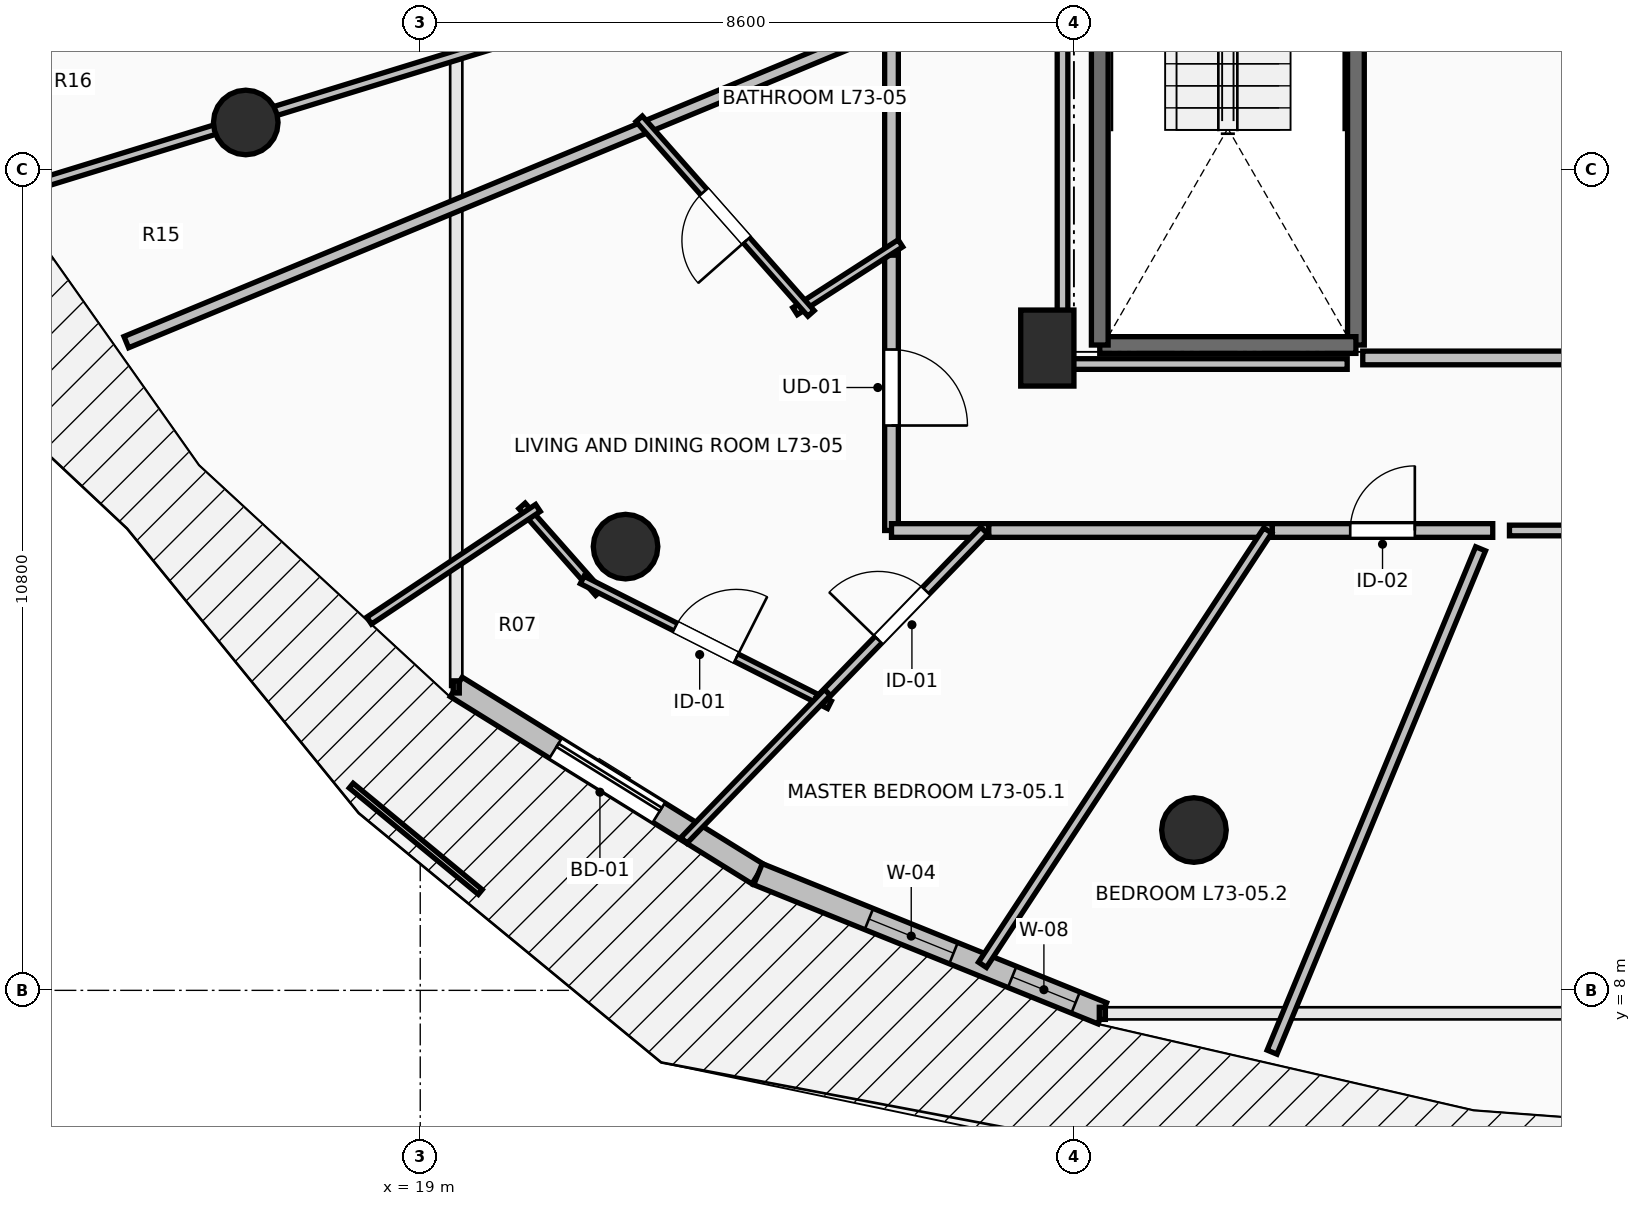
"""IFC4 building model, lengths in metres.
Left out: names, types, materials, properties, quantities, classifications, styles, units other than length and angle.
Written with IfcOpenShell. Run it as: python <this file> out.ifc"""

import sys

from ifc_helpers import new_model, si_unit, direction, frame, frame_2d, origin, origin_2d, place, context, subcontext, project, spatial, rectangle, circle, extrude, element, fill, save


model = new_model("IFC4")
c1 = context("Model", 3, precision=1e-05, world=origin(), true_north=direction((0.0, 1.0)))
c2 = subcontext(c1, "Body", "Model", "MODEL_VIEW")
j1 = project(units=[si_unit("LENGTHUNIT", "METRE"), si_unit("PLANEANGLEUNIT", "RADIAN")], contexts=[c1])
p1 = place(None, origin())
s1 = spatial("IfcSite", under=j1, at=p1, CompositionType="ELEMENT")
p2 = place(p1, origin())
s2 = spatial("IfcBuilding", under=s1, at=p2, CompositionType="ELEMENT")
p3 = place(p2, frame((0.0, 0.0, 269.75)))
s3 = spatial("IfcBuildingStorey", under=s2, at=p3, CompositionType="ELEMENT", Elevation=269.75)
for number, where, z_axis, x_axis in (
    (1, (16.705, 19.418, 0.0), (0.0, 0.0, 1.0), (-0.924, -0.383, 0.0)),
    (2, (21.701, 13.838, 0.0), (0.0, 0.0, 1.0), (-0.707, -0.707, 0.0)),
    (3, (29.179, 10.109, 0.0), (0.0, 0.0, 1.0), (-0.383, -0.924, 0.0)),
):
    element("IfcColumn", number, at=place(p3, frame(where, z_axis=z_axis, x_axis=x_axis)), inside=s3, PredefinedType="COLUMN", context=c2, shape_type="SweptSolid", body=[
        extrude(circle(Radius=0.425, at=origin_2d()), origin(), (0.0, 0.0, 1.0), 3.55),
    ])
p4 = place(p3, frame((27.25, 16.45, 0.0), z_axis=(0.0, 0.0, 1.0), x_axis=(1.0, 0.0, 0.0)))
e4 = element("IfcColumn", 4, at=p4, inside=s3, PredefinedType="PILASTER", context=c2, shape_type="SweptSolid", body=[
    extrude(rectangle(XDim=0.7, YDim=1.0, at=origin_2d()), origin(), (0.0, 0.0, 1.0), 3.55),
])
p5 = place(p3, frame((19.474, 11.992, 0.0), z_axis=(0.0, 0.0, 1.0), x_axis=(0.849702323036, -0.527262707032, 0.0)))
e5 = element("IfcWall", 5, at=p5, inside=s3, PredefinedType="STANDARD", context=c2, shape_type="SweptSolid", body=[
    extrude(rectangle(XDim=4.672, YDim=0.3, at=frame_2d((2.336, 0.0))), origin(), (0.0, 0.0, 1.0), 3.29),
])
p6 = place(p5, frame((1.536, 0.0, 0.0)))
e6 = element("IfcOpeningElement", 6, at=p6, cuts=e5, PredefinedType="OPENING", context=c2, shape_type="SweptSolid", body=[
    extrude(rectangle(XDim=1.6, YDim=2.3, at=frame_2d((0.8, 1.15))), frame((0.0, 0.165, 0.0), z_axis=(0.0, -1.0, 0.0), x_axis=(1.0, 0.0, 0.0)), (0.0, 0.0, 1.0), 0.33),
])
p7 = place(p3, frame((23.444, 9.529, 0.0), z_axis=(0.0, 0.0, 1.0), x_axis=(0.927147375511, -0.374696869594, 0.0)))
e7 = element("IfcWall", 7, at=p7, inside=s3, PredefinedType="STANDARD", context=c2, shape_type="SweptSolid", body=[
    extrude(rectangle(XDim=4.885, YDim=0.3, at=frame_2d((2.443, 0.0))), origin(), (0.0, 0.0, 1.0), 3.29),
])
p8 = place(p7, frame((1.574, 0.0, 0.85)))
e8 = element("IfcOpeningElement", 8, at=p8, cuts=e7, PredefinedType="OPENING", context=c2, shape_type="SweptSolid", body=[
    extrude(rectangle(XDim=1.2, YDim=1.95, at=frame_2d((0.6, 0.975))), frame((0.0, 0.165, 0.0), z_axis=(0.0, -1.0, 0.0), x_axis=(1.0, 0.0, 0.0)), (0.0, 0.0, 1.0), 0.33),
])
p9 = place(p7, frame((3.606, 0.0, 0.85)))
e9 = element("IfcOpeningElement", 9, at=p9, cuts=e7, PredefinedType="OPENING", context=c2, shape_type="SweptSolid", body=[
    extrude(rectangle(XDim=0.9, YDim=1.8, at=frame_2d((0.45, 0.9))), frame((0.0, 0.165, 0.0), z_axis=(0.0, -1.0, 0.0), x_axis=(1.0, 0.0, 0.0)), (0.0, 0.0, 1.0), 0.33),
])
p10 = place(p3, frame((31.31, 23.91, 0.0), z_axis=(0.0, 0.0, 1.0), x_axis=(0.0, -1.0, 0.0)))
e10 = element("IfcWall", 10, at=p10, inside=s3, PredefinedType="SOLIDWALL", context=c2, shape_type="SweptSolid", body=[
    extrude(rectangle(XDim=7.42, YDim=0.22, at=frame_2d((3.71, 0.0))), origin(), (0.0, 0.0, 1.0), 3.29),
])
p11 = place(p3, frame((31.31, 16.49, 0.0), z_axis=(0.0, 0.0, 1.0), x_axis=(-1.0, 0.0, 0.0)))
e11 = element("IfcWall", 11, at=p11, inside=s3, PredefinedType="SOLIDWALL", context=c2, shape_type="SweptSolid", body=[
    extrude(rectangle(XDim=3.37, YDim=0.22, at=frame_2d((1.685, 0.0))), origin(), (0.0, 0.0, 1.0), 3.29),
])
p12 = place(p3, frame((27.94, 16.49, 0.0), z_axis=(0.0, 0.0, 1.0), x_axis=(0.0, 1.0, 0.0)))
e12 = element("IfcWall", 12, at=p12, inside=s3, PredefinedType="SOLIDWALL", context=c2, shape_type="SweptSolid", body=[
    extrude(rectangle(XDim=7.42, YDim=0.22, at=frame_2d((3.71, 0.0))), origin(), (0.0, 0.0, 1.0), 3.29),
])
p13 = place(p3, frame((31.4, 16.32, 0.0), z_axis=(0.0, 0.0, 1.0), x_axis=(1.0, 0.0, 0.0)))
e13 = element("IfcWall", 13, at=p13, inside=s3, PredefinedType="PARTITIONING", context=c2, shape_type="SweptSolid", body=[
    extrude(rectangle(XDim=7.4, YDim=0.18, at=frame_2d((3.7, 0.0))), origin(), (0.0, 0.0, 1.0), 3.29),
])
p14 = place(p13, frame((3.275, 0.0, 0.0)))
e14 = element("IfcOpeningElement", 14, at=p14, cuts=e13, PredefinedType="OPENING", context=c2, shape_type="SweptSolid", body=[
    extrude(rectangle(XDim=0.85, YDim=2.1, at=frame_2d((0.425, 1.05))), frame((0.0, 0.105, 0.0), z_axis=(0.0, -1.0, 0.0), x_axis=(1.0, 0.0, 0.0)), (0.0, 0.0, 1.0), 0.21),
])
p15 = place(p3, frame((25.2, 17.812, 0.0), z_axis=(0.0, 0.0, 1.0), x_axis=(0.0, -1.0, 0.0)))
e15 = element("IfcWall", 15, at=p15, inside=s3, PredefinedType="PARTITIONING", context=c2, shape_type="SweptSolid", body=[
    extrude(rectangle(XDim=3.762, YDim=0.18, at=frame_2d((1.881, 0.0))), origin(), (0.0, 0.0, 1.0), 2.482),
])
p16 = place(p15, frame((1.381, 0.0, 0.0)))
e16 = element("IfcOpeningElement", 16, at=p16, cuts=e15, PredefinedType="OPENING", context=c2, shape_type="SweptSolid", body=[
    extrude(rectangle(XDim=1.0, YDim=2.15, at=frame_2d((0.5, 1.075))), frame((0.0, 0.105, 0.0), z_axis=(0.0, -1.0, 0.0), x_axis=(1.0, 0.0, 0.0)), (0.0, 0.0, 1.0), 0.21),
])
p17 = place(p3, frame((25.2, 14.05, 0.0), z_axis=(0.0, 0.0, 1.0), x_axis=(1.0, 0.0, 0.0)))
e17 = element("IfcWall", 17, at=p17, inside=s3, PredefinedType="PARTITIONING", context=c2, shape_type="SweptSolid", body=[
    extrude(rectangle(XDim=1.28, YDim=0.18, at=frame_2d((0.64, 0.0))), origin(), (0.0, 0.0, 1.0), 2.936),
])
p18 = place(p3, frame((25.2, 20.773, 0.0), z_axis=(0.0, 0.0, 1.0), x_axis=(0.0, -1.0, 0.0)))
e18 = element("IfcWall", 18, at=p18, inside=s3, PredefinedType="PARTITIONING", context=c2, shape_type="SweptSolid", body=[
    extrude(rectangle(XDim=3.101, YDim=0.18, at=frame_2d((1.55, 0.0))), origin(), (0.0, 0.0, 1.0), 3.29),
])
p19 = place(p3, frame((26.48, 14.05, 0.0), z_axis=(0.0, 0.0, 1.0), x_axis=(1.0, 0.0, 0.0)))
e19 = element("IfcWall", 19, at=p19, inside=s3, PredefinedType="PARTITIONING", context=c2, shape_type="SweptSolid", body=[
    extrude(rectangle(XDim=3.73, YDim=0.18, at=frame_2d((1.865, 0.0))), origin(), (0.0, 0.0, 1.0), 2.482),
])
p20 = place(p3, frame((30.21, 14.05, 0.0), z_axis=(0.0, 0.0, 1.0), x_axis=(1.0, 0.0, 0.0)))
e20 = element("IfcWall", 20, at=p20, inside=s3, PredefinedType="PARTITIONING", context=c2, shape_type="SweptSolid", body=[
    extrude(rectangle(XDim=2.9, YDim=0.18, at=frame_2d((1.45, 0.0))), origin(), (0.0, 0.0, 1.0), 2.979),
])
p21 = place(p20, frame((1.025, 0.0, 0.0)))
e21 = element("IfcOpeningElement", 21, at=p21, cuts=e20, PredefinedType="OPENING", context=c2, shape_type="SweptSolid", body=[
    extrude(rectangle(XDim=0.85, YDim=2.1, at=frame_2d((0.425, 1.05))), frame((0.0, 0.105, 0.0), z_axis=(0.0, -1.0, 0.0), x_axis=(1.0, 0.0, 0.0)), (0.0, 0.0, 1.0), 0.21),
])
p22 = place(p3, frame((13.747, 18.539, 0.0), z_axis=(0.0, 0.0, 1.0), x_axis=(0.955802794564, 0.294008533725, 0.0)))
e22 = element("IfcWall", 22, at=p22, inside=s3, PredefinedType="PARTITIONING", context=c2, shape_type="SweptSolid", body=[
    extrude(rectangle(XDim=11.982, YDim=0.125, at=frame_2d((5.991, 0.0))), origin(), (0.0, 0.0, 1.0), 2.482),
])
p23 = place(p3, frame((15.133, 16.528, 0.0), z_axis=(0.0, 0.0, 1.0), x_axis=(0.923877013663, 0.382689513347, 0.0)))
e23 = element("IfcWall", 23, at=p23, inside=s3, PredefinedType="PARTITIONING", context=c2, shape_type="SweptSolid", body=[
    extrude(rectangle(XDim=10.896, YDim=0.16, at=frame_2d((5.448, 0.0))), origin(), (0.0, 0.0, 1.0), 2.482),
])
p24 = place(p3, frame((25.318, 17.828, 0.0), z_axis=(0.0, 0.0, 1.0), x_axis=(-0.840783734709, -0.541371140207, 0.0)))
e24 = element("IfcWall", 24, at=p24, inside=s3, PredefinedType="PARTITIONING", context=c2, shape_type="SweptSolid", body=[
    extrude(rectangle(XDim=1.649, YDim=0.11, at=frame_2d((0.824, 0.0))), origin(), (0.0, 0.0, 1.0), 2.482),
])
p25 = place(p3, frame((24.142, 16.906, 0.0), z_axis=(0.0, 0.0, 1.0), x_axis=(-0.662044708061, 0.749464345068, 0.0)))
e25 = element("IfcWall", 25, at=p25, inside=s3, PredefinedType="PARTITIONING", context=c2, shape_type="SweptSolid", body=[
    extrude(rectangle(XDim=3.416, YDim=0.11, at=frame_2d((1.708, 0.0))), origin(), (0.0, 0.0, 1.0), 2.482),
])
p26 = place(p25, frame((1.283, 0.0, 0.0)))
e26 = element("IfcOpeningElement", 26, at=p26, cuts=e25, PredefinedType="OPENING", context=c2, shape_type="SweptSolid", body=[
    extrude(rectangle(XDim=0.85, YDim=2.1, at=frame_2d((0.425, 1.05))), frame((0.0, 0.07, 0.0), z_axis=(0.0, -1.0, 0.0), x_axis=(1.0, 0.0, 0.0)), (0.0, 0.0, 1.0), 0.14),
])
p27 = place(p3, frame((20.339, 14.374, 0.0), z_axis=(0.0, 0.0, 1.0), x_axis=(0.662352602393, -0.749192251764, 0.0)))
e27 = element("IfcWall", 27, at=p27, inside=s3, PredefinedType="PARTITIONING", context=c2, shape_type="SweptSolid", body=[
    extrude(rectangle(XDim=1.524, YDim=0.11, at=frame_2d((0.762, 0.0))), origin(), (0.0, 0.0, 1.0), 3.29),
])
p28 = place(p3, frame((21.131, 13.4, 0.0), z_axis=(0.0, 0.0, 1.0), x_axis=(0.892570631547, -0.450907604394, 0.0)))
e28 = element("IfcWall", 28, at=p28, inside=s3, PredefinedType="PARTITIONING", context=c2, shape_type="SweptSolid", body=[
    extrude(rectangle(XDim=3.645, YDim=0.11, at=frame_2d((1.822, 0.0))), origin(), (0.0, 0.0, 1.0), 3.29),
])
p29 = place(p28, frame((1.372, 0.0, 0.0)))
e29 = element("IfcOpeningElement", 29, at=p29, cuts=e28, PredefinedType="OPENING", context=c2, shape_type="SweptSolid", body=[
    extrude(rectangle(XDim=0.9, YDim=2.1, at=frame_2d((0.45, 1.05))), frame((0.0, 0.07, 0.0), z_axis=(0.0, -1.0, 0.0), x_axis=(1.0, 0.0, 0.0)), (0.0, 0.0, 1.0), 0.14),
])
p30 = place(p3, frame((18.328, 12.864, 0.0), z_axis=(0.0, 0.0, 1.0), x_axis=(0.831712526046, 0.555206514748, 0.0)))
e30 = element("IfcWall", 30, at=p30, inside=s3, PredefinedType="PARTITIONING", context=c2, shape_type="SweptSolid", body=[
    extrude(rectangle(XDim=2.67, YDim=0.11, at=frame_2d((1.335, 0.0))), origin(), (0.0, 0.0, 1.0), 3.29),
])
p31 = place(p3, frame((24.259, 11.82, 0.0), z_axis=(0.0, 0.0, 1.0), x_axis=(0.695894072482, 0.718144442215, 0.0)))
e31 = element("IfcWall", 31, at=p31, inside=s3, PredefinedType="PARTITIONING", context=c2, shape_type="SweptSolid", body=[
    extrude(rectangle(XDim=3.105, YDim=0.125, at=frame_2d((1.553, 0.0))), origin(), (0.0, 0.0, 1.0), 2.874),
])
p32 = place(p31, frame((1.103, 0.0, 0.0)))
e32 = element("IfcOpeningElement", 32, at=p32, cuts=e31, PredefinedType="OPENING", context=c2, shape_type="SweptSolid", body=[
    extrude(rectangle(XDim=0.9, YDim=2.1, at=frame_2d((0.45, 1.05))), frame((0.0, 0.077, 0.0), z_axis=(0.0, -1.0, 0.0), x_axis=(1.0, 0.0, 0.0)), (0.0, 0.0, 1.0), 0.155),
])
p33 = place(p3, frame((22.469, 9.973, 0.0), z_axis=(0.0, 0.0, 1.0), x_axis=(0.695944713466, 0.718095366786, 0.0)))
e33 = element("IfcWall", 33, at=p33, inside=s3, PredefinedType="PARTITIONING", context=c2, shape_type="SweptSolid", body=[
    extrude(rectangle(XDim=2.711, YDim=0.11, at=frame_2d((1.356, 0.0))), origin(), (0.0, 0.0, 1.0), 3.29),
])
p34 = place(p3, frame((26.397, 8.336, 0.0), z_axis=(0.0, 0.0, 1.0), x_axis=(0.548967647923, 0.835843598728, 0.0)))
e34 = element("IfcWall", 34, at=p34, inside=s3, PredefinedType="PARTITIONING", context=c2, shape_type="SweptSolid", body=[
    extrude(rectangle(XDim=6.836, YDim=0.125, at=frame_2d((3.418, 0.0))), origin(), (0.0, 0.0, 1.0), 2.482),
])
p35 = place(p3, frame((33.33, 14.05, 0.0), z_axis=(0.0, 0.0, 1.0), x_axis=(1.0, 0.0, 0.0)))
e35 = element("IfcWall", 35, at=p35, inside=s3, PredefinedType="PARTITIONING", context=c2, shape_type="SweptSolid", body=[
    extrude(rectangle(XDim=3.22, YDim=0.14, at=frame_2d((1.61, 0.0))), origin(), (0.0, 0.0, 1.0), 2.979),
])
p36 = place(p3, frame((27.45, 23.754, 0.0), z_axis=(0.0, 0.0, 1.0), x_axis=(0.0, -1.0, 0.0)))
e36 = element("IfcWall", 36, at=p36, inside=s3, PredefinedType="PARTITIONING", context=c2, shape_type="SweptSolid", body=[
    extrude(rectangle(XDim=7.514, YDim=0.14, at=frame_2d((3.757, 0.0))), origin(), (0.0, 0.0, 1.0), 2.482),
])
p37 = place(p3, frame((27.45, 16.24, 0.0), z_axis=(0.0, 0.0, 1.0), x_axis=(1.0, 0.0, 0.0)))
e37 = element("IfcWall", 37, at=p37, inside=s3, PredefinedType="PARTITIONING", context=c2, shape_type="SweptSolid", body=[
    extrude(rectangle(XDim=3.745, YDim=0.14, at=frame_2d((1.873, 0.0))), origin(), (0.0, 0.0, 1.0), 2.482),
])
p38 = place(p3, frame((30.207, 7.187, 0.0), z_axis=(0.0, 0.0, 1.0), x_axis=(0.382679691634, 0.923881081964, 0.0)))
e38 = element("IfcWall", 38, at=p38, inside=s3, PredefinedType="PARTITIONING", context=c2, shape_type="SweptSolid", body=[
    extrude(rectangle(XDim=7.168, YDim=0.14, at=frame_2d((3.584, 0.0))), origin(), (0.0, 0.0, 1.0), 2.874),
])
p39 = place(p6, origin())
e39 = element("IfcDoor", 39, at=p39, inside=s3, OperationType="SLIDING_TO_LEFT", PredefinedType="DOOR", context=c2, shape_type="SweptSolid", body=[
    extrude(rectangle(XDim=1.6, YDim=2.3, at=frame_2d((0.8, 1.15))), frame((0.0, 0.025, 0.0), z_axis=(0.0, -1.0, 0.0), x_axis=(1.0, 0.0, 0.0)), (0.0, 0.0, 1.0), 0.05),
])
fill(e6, e39)
p40 = place(p8, origin())
e40 = element("IfcWindow", 40, at=p40, inside=s3, PartitioningType="SINGLE_PANEL", PredefinedType="WINDOW", context=c2, shape_type="SweptSolid", body=[
    extrude(rectangle(XDim=1.2, YDim=1.95, at=frame_2d((0.6, 0.975))), frame((0.0, 0.03, 0.0), z_axis=(0.0, -1.0, 0.0), x_axis=(1.0, 0.0, 0.0)), (0.0, 0.0, 1.0), 0.06),
])
fill(e8, e40)
p41 = place(p9, origin())
e41 = element("IfcWindow", 41, at=p41, inside=s3, PartitioningType="SINGLE_PANEL", PredefinedType="WINDOW", context=c2, shape_type="SweptSolid", body=[
    extrude(rectangle(XDim=0.9, YDim=1.8, at=frame_2d((0.45, 0.9))), frame((0.0, 0.03, 0.0), z_axis=(0.0, -1.0, 0.0), x_axis=(1.0, 0.0, 0.0)), (0.0, 0.0, 1.0), 0.06),
])
fill(e9, e41)
p42 = place(p16, origin())
e42 = element("IfcDoor", 42, at=p42, inside=s3, OperationType="SINGLE_SWING_RIGHT", PredefinedType="DOOR", context=c2, shape_type="SweptSolid", body=[
    extrude(rectangle(XDim=1.0, YDim=2.15, at=frame_2d((0.5, 1.075))), frame((0.0, 0.025, 0.0), z_axis=(0.0, -1.0, 0.0), x_axis=(1.0, 0.0, 0.0)), (0.0, 0.0, 1.0), 0.05),
])
fill(e16, e42)
p43 = place(p26, origin())
e43 = element("IfcDoor", 43, at=p43, inside=s3, OperationType="SINGLE_SWING_LEFT", PredefinedType="DOOR", context=c2, shape_type="SweptSolid", body=[
    extrude(rectangle(XDim=0.85, YDim=2.1, at=frame_2d((0.425, 1.05))), frame((0.0, 0.025, 0.0), z_axis=(0.0, -1.0, 0.0), x_axis=(1.0, 0.0, 0.0)), (0.0, 0.0, 1.0), 0.05),
])
fill(e26, e43)
p44 = place(p29, origin())
e44 = element("IfcDoor", 44, at=p44, inside=s3, OperationType="SINGLE_SWING_RIGHT", PredefinedType="DOOR", context=c2, shape_type="SweptSolid", body=[
    extrude(rectangle(XDim=0.9, YDim=2.1, at=frame_2d((0.45, 1.05))), frame((0.0, 0.025, 0.0), z_axis=(0.0, -1.0, 0.0), x_axis=(1.0, 0.0, 0.0)), (0.0, 0.0, 1.0), 0.05),
])
fill(e29, e44)
p45 = place(p32, origin())
e45 = element("IfcDoor", 45, at=p45, inside=s3, OperationType="SINGLE_SWING_LEFT", PredefinedType="DOOR", context=c2, shape_type="SweptSolid", body=[
    extrude(rectangle(XDim=0.9, YDim=2.1, at=frame_2d((0.45, 1.05))), frame((0.0, 0.025, 0.0), z_axis=(0.0, -1.0, 0.0), x_axis=(1.0, 0.0, 0.0)), (0.0, 0.0, 1.0), 0.05),
])
fill(e32, e45)
p46 = place(p21, origin())
e46 = element("IfcDoor", 46, at=p46, inside=s3, OperationType="SINGLE_SWING_RIGHT", PredefinedType="DOOR", context=c2, shape_type="SweptSolid", body=[
    extrude(rectangle(XDim=0.85, YDim=2.1, at=frame_2d((0.425, 1.05))), frame((0.0, 0.025, 0.0), z_axis=(0.0, -1.0, 0.0), x_axis=(1.0, 0.0, 0.0)), (0.0, 0.0, 1.0), 0.05),
])
fill(e21, e46)
save(model, sys.argv[1])
